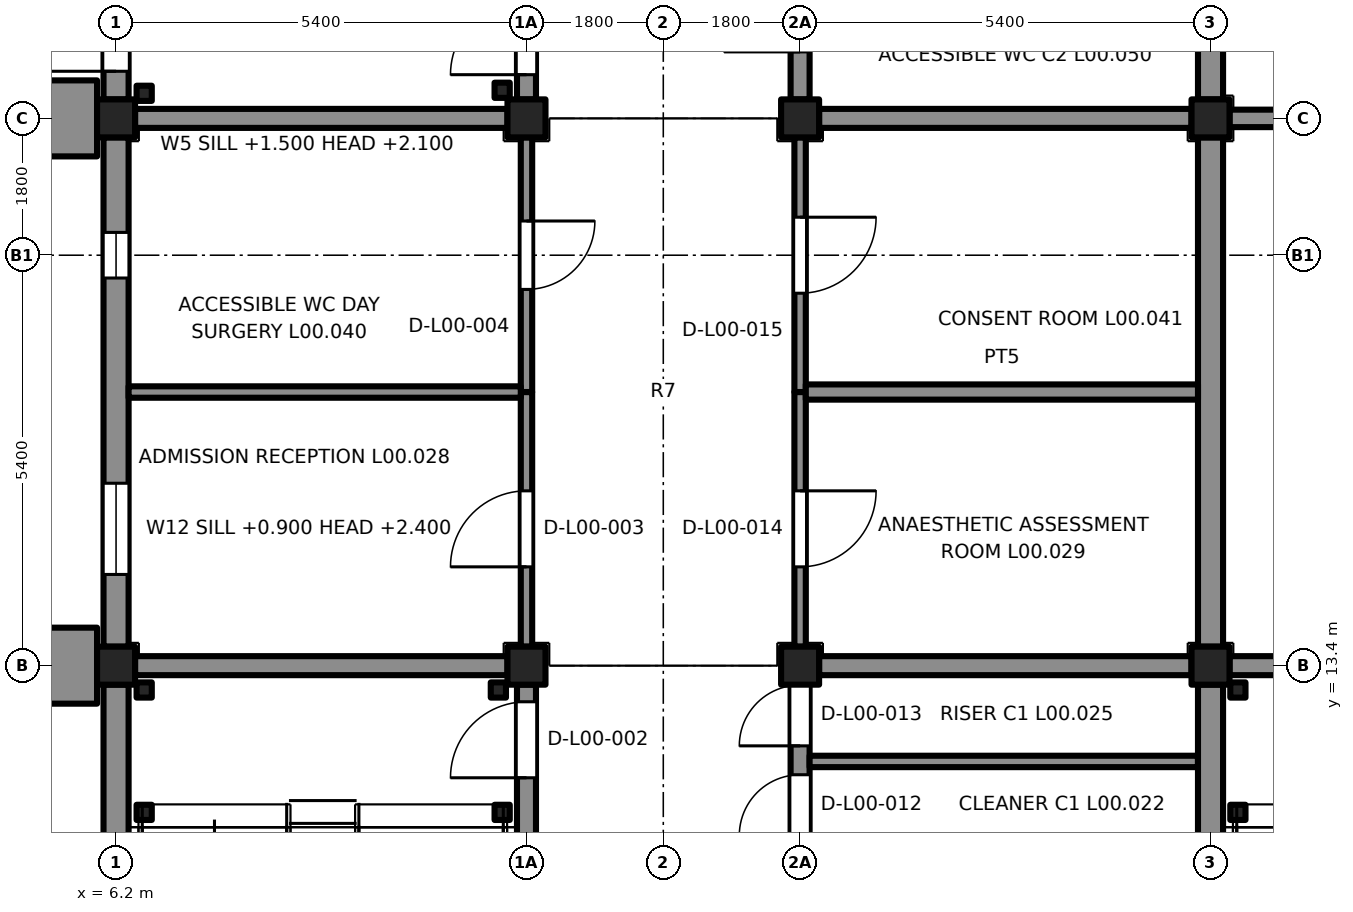
"""IFC4 building model, lengths in metres.
Left out: names, types, materials, properties, quantities, classifications, styles, units other than length and angle.
Written with IfcOpenShell. Run it as: python <this file> out.ifc"""

import sys

from ifc_helpers import new_model, si_unit, direction, frame, frame_2d, origin, origin_2d, place, context, subcontext, project, spatial, rectangle, extrude, element, fill, save


model = new_model("IFC4")
c1 = context("Model", 3, precision=1e-05, world=origin(), true_north=direction((0.0, 1.0)))
c2 = subcontext(c1, "Body", "Model", "MODEL_VIEW")
j1 = project(units=[si_unit("LENGTHUNIT", "METRE"), si_unit("PLANEANGLEUNIT", "RADIAN")], contexts=[c1])
p1 = place(None, origin())
s1 = spatial("IfcSite", under=j1, at=p1, CompositionType="ELEMENT")
p2 = place(p1, origin())
s2 = spatial("IfcBuilding", under=s1, at=p2, CompositionType="ELEMENT")
p3 = place(p2, origin())
s3 = spatial("IfcBuildingStorey", under=s2, at=p3, CompositionType="ELEMENT", Elevation=0.0)
for number, where, z_axis, x_axis in (
    (1, (6.2, 13.4, -0.2), (0.0, 0.0, 1.0), (1.0, 0.0, 0.0)),
    (2, (6.2, 20.6, -0.2), (0.0, 0.0, 1.0), (1.0, 0.0, 0.0)),
    (3, (11.6, 13.4, -0.2), (0.0, 0.0, 1.0), (1.0, 0.0, 0.0)),
    (4, (11.6, 20.6, -0.2), (0.0, 0.0, 1.0), (1.0, 0.0, 0.0)),
    (5, (15.2, 13.4, -0.2), (0.0, 0.0, 1.0), (1.0, 0.0, 0.0)),
    (6, (15.2, 20.6, -0.2), (0.0, 0.0, 1.0), (1.0, 0.0, 0.0)),
    (7, (20.6, 13.4, -0.2), (0.0, 0.0, 1.0), (1.0, 0.0, 0.0)),
    (8, (20.6, 20.6, -0.2), (0.0, 0.0, 1.0), (1.0, 0.0, 0.0)),
):
    element("IfcColumn", number, at=place(p3, frame(where, z_axis=z_axis, x_axis=x_axis)), inside=s3, PredefinedType="COLUMN", context=c2, shape_type="SweptSolid", body=[
        extrude(rectangle(XDim=0.5, YDim=0.5, at=origin_2d()), origin(), (0.0, 0.0, 1.0), 5.45),
    ])
p4 = place(p3, frame((11.6, 6.365, 0.0), z_axis=(0.0, 0.0, 1.0), x_axis=(0.0, 1.0, 0.0)))
e9 = element("IfcWall", 9, at=p4, inside=s3, PredefinedType="SHEAR", context=c2, shape_type="SweptSolid", body=[
    extrude(rectangle(XDim=6.785, YDim=0.25, at=frame_2d((3.393, 0.0))), origin(), (0.0, 0.0, 1.0), 6.05),
])
p5 = place(p4, frame((5.56, 0.0, 0.0)))
e10 = element("IfcOpeningElement", 10, at=p5, cuts=e9, PredefinedType="OPENING", context=c2, shape_type="SweptSolid", body=[
    extrude(rectangle(XDim=1.0, YDim=2.1, at=frame_2d((0.5, 1.05))), frame((0.0, 0.135, 0.0), z_axis=(0.0, -1.0, 0.0), x_axis=(1.0, 0.0, 0.0)), (0.0, 0.0, 1.0), 0.27),
])
p6 = place(p3, frame((6.45, 13.4, 0.0), z_axis=(0.0, 0.0, 1.0), x_axis=(1.0, 0.0, 0.0)))
e11 = element("IfcWall", 11, at=p6, inside=s3, PredefinedType="SHEAR", context=c2, shape_type="SweptSolid", body=[
    extrude(rectangle(XDim=4.9, YDim=0.25, at=frame_2d((2.45, 0.0))), origin(), (0.0, 0.0, 1.0), 6.05),
])
p7 = place(p3, frame((15.2, 6.365, 0.0), z_axis=(0.0, 0.0, 1.0), x_axis=(0.0, 1.0, 0.0)))
e12 = element("IfcWall", 12, at=p7, inside=s3, PredefinedType="SHEAR", context=c2, shape_type="SweptSolid", body=[
    extrude(rectangle(XDim=6.785, YDim=0.25, at=frame_2d((3.393, 0.0))), origin(), (0.0, 0.0, 1.0), 6.05),
])
p8 = place(p7, frame((0.75, 0.0, 0.0)))
e13 = element("IfcOpeningElement", 13, at=p8, cuts=e12, PredefinedType="OPENING", context=c2, shape_type="SweptSolid", body=[
    extrude(rectangle(XDim=1.0, YDim=2.1, at=frame_2d((0.5, 1.05))), frame((0.0, 0.135, 0.0), z_axis=(0.0, -1.0, 0.0), x_axis=(1.0, 0.0, 0.0)), (0.0, 0.0, 1.0), 0.27),
])
p9 = place(p7, frame((3.15, 0.0, 0.0)))
e14 = element("IfcOpeningElement", 14, at=p9, cuts=e12, PredefinedType="OPENING", context=c2, shape_type="SweptSolid", body=[
    extrude(rectangle(XDim=0.9, YDim=2.1, at=frame_2d((0.45, 1.05))), frame((0.0, 0.135, 0.0), z_axis=(0.0, -1.0, 0.0), x_axis=(1.0, 0.0, 0.0)), (0.0, 0.0, 1.0), 0.27),
])
p10 = place(p7, frame((4.8, 0.0, 0.0)))
e15 = element("IfcOpeningElement", 15, at=p10, cuts=e12, PredefinedType="OPENING", context=c2, shape_type="SweptSolid", body=[
    extrude(rectangle(XDim=0.8, YDim=2.1, at=frame_2d((0.4, 1.05))), frame((0.0, 0.135, 0.0), z_axis=(0.0, -1.0, 0.0), x_axis=(1.0, 0.0, 0.0)), (0.0, 0.0, 1.0), 0.27),
])
p11 = place(p7, frame((5.98, 0.0, 0.0)))
e16 = element("IfcOpeningElement", 16, at=p11, cuts=e12, PredefinedType="OPENING", context=c2, shape_type="SweptSolid", body=[
    extrude(rectangle(XDim=0.8, YDim=2.1, at=frame_2d((0.4, 1.05))), frame((0.0, 0.135, 0.0), z_axis=(0.0, -1.0, 0.0), x_axis=(1.0, 0.0, 0.0)), (0.0, 0.0, 1.0), 0.27),
])
p12 = place(p3, frame((15.45, 13.4, 0.0), z_axis=(0.0, 0.0, 1.0), x_axis=(1.0, 0.0, 0.0)))
e17 = element("IfcWall", 17, at=p12, inside=s3, PredefinedType="SHEAR", context=c2, shape_type="SweptSolid", body=[
    extrude(rectangle(XDim=4.9, YDim=0.25, at=frame_2d((2.45, 0.0))), origin(), (0.0, 0.0, 1.0), 6.05),
])
p13 = place(p3, frame((15.325, 12.14, 0.0), z_axis=(0.0, 0.0, 1.0), x_axis=(1.0, 0.0, 0.0)))
e18 = element("IfcWall", 18, at=p13, inside=s3, PredefinedType="PARTITIONING", context=c2, shape_type="SweptSolid", body=[
    extrude(rectangle(XDim=5.11, YDim=0.15, at=frame_2d((2.555, 0.0))), origin(), (0.0, 0.0, 1.0), 6.05),
])
for number, where, z_axis, x_axis in (
    (19, (6.57, 11.47, 0.0), (0.0, 0.0, 1.0), (1.0, 0.0, 0.0)),
    (20, (6.57, 13.08, 0.0), (0.0, 0.0, 1.0), (1.0, 0.0, 0.0)),
    (21, (11.28, 11.47, 0.0), (0.0, 0.0, 1.0), (1.0, 0.0, 0.0)),
    (22, (11.23, 13.08, 0.0), (0.0, 0.0, 1.0), (1.0, 0.0, 0.0)),
):
    element("IfcColumn", number, at=place(p3, frame(where, z_axis=z_axis, x_axis=x_axis)), inside=s3, PredefinedType="COLUMN", context=c2, shape_type="SweptSolid", body=[
        extrude(rectangle(XDim=0.2, YDim=0.2, at=origin_2d()), origin(), (0.0, 0.0, 1.0), 2.95),
    ])
p14 = place(p3, frame((11.6, 20.85, 0.0), z_axis=(0.0, 0.0, 1.0), x_axis=(0.0, 1.0, 0.0)))
e23 = element("IfcWall", 23, at=p14, inside=s3, PredefinedType="SHEAR", context=c2, shape_type="SweptSolid", body=[
    extrude(rectangle(XDim=6.7, YDim=0.25, at=frame_2d((3.35, 0.0))), origin(), (0.0, 0.0, 1.0), 6.05),
])
p15 = place(p14, frame((0.325, 0.0, 0.0)))
e24 = element("IfcOpeningElement", 24, at=p15, cuts=e23, PredefinedType="OPENING", context=c2, shape_type="SweptSolid", body=[
    extrude(rectangle(XDim=1.0, YDim=2.1, at=frame_2d((0.5, 1.05))), frame((0.0, 0.135, 0.0), z_axis=(0.0, -1.0, 0.0), x_axis=(1.0, 0.0, 0.0)), (0.0, 0.0, 1.0), 0.27),
])
p16 = place(p3, frame((6.45, 20.6, 0.0), z_axis=(0.0, 0.0, 1.0), x_axis=(1.0, 0.0, 0.0)))
e25 = element("IfcWall", 25, at=p16, inside=s3, PredefinedType="SHEAR", context=c2, shape_type="SweptSolid", body=[
    extrude(rectangle(XDim=4.9, YDim=0.25, at=frame_2d((2.45, 0.0))), origin(), (0.0, 0.0, 1.0), 6.05),
])
p17 = place(p3, frame((15.2, 20.85, 0.0), z_axis=(0.0, 0.0, 1.0), x_axis=(0.0, 1.0, 0.0)))
e26 = element("IfcWall", 26, at=p17, inside=s3, PredefinedType="SHEAR", context=c2, shape_type="SweptSolid", body=[
    extrude(rectangle(XDim=6.7, YDim=0.25, at=frame_2d((3.35, 0.0))), origin(), (0.0, 0.0, 1.0), 6.05),
])
p18 = place(p17, frame((0.625, 0.0, 0.0)))
e27 = element("IfcOpeningElement", 27, at=p18, cuts=e26, PredefinedType="OPENING", context=c2, shape_type="SweptSolid", body=[
    extrude(rectangle(XDim=1.0, YDim=2.1, at=frame_2d((0.5, 1.05))), frame((0.0, 0.135, 0.0), z_axis=(0.0, -1.0, 0.0), x_axis=(1.0, 0.0, 0.0)), (0.0, 0.0, 1.0), 0.27),
])
p19 = place(p17, frame((3.025, 0.0, 0.0)))
e28 = element("IfcOpeningElement", 28, at=p19, cuts=e26, PredefinedType="OPENING", context=c2, shape_type="SweptSolid", body=[
    extrude(rectangle(XDim=0.9, YDim=2.1, at=frame_2d((0.45, 1.05))), frame((0.0, 0.135, 0.0), z_axis=(0.0, -1.0, 0.0), x_axis=(1.0, 0.0, 0.0)), (0.0, 0.0, 1.0), 0.27),
])
p20 = place(p17, frame((4.675, 0.0, 0.0)))
e29 = element("IfcOpeningElement", 29, at=p20, cuts=e26, PredefinedType="OPENING", context=c2, shape_type="SweptSolid", body=[
    extrude(rectangle(XDim=0.8, YDim=2.1, at=frame_2d((0.4, 1.05))), frame((0.0, 0.135, 0.0), z_axis=(0.0, -1.0, 0.0), x_axis=(1.0, 0.0, 0.0)), (0.0, 0.0, 1.0), 0.27),
])
p21 = place(p17, frame((5.875, 0.0, 0.0)))
e30 = element("IfcOpeningElement", 30, at=p21, cuts=e26, PredefinedType="OPENING", context=c2, shape_type="SweptSolid", body=[
    extrude(rectangle(XDim=0.8, YDim=2.1, at=frame_2d((0.4, 1.05))), frame((0.0, 0.135, 0.0), z_axis=(0.0, -1.0, 0.0), x_axis=(1.0, 0.0, 0.0)), (0.0, 0.0, 1.0), 0.27),
])
p22 = place(p3, frame((15.45, 20.6, 0.0), z_axis=(0.0, 0.0, 1.0), x_axis=(1.0, 0.0, 0.0)))
e31 = element("IfcWall", 31, at=p22, inside=s3, PredefinedType="SHEAR", context=c2, shape_type="SweptSolid", body=[
    extrude(rectangle(XDim=4.9, YDim=0.25, at=frame_2d((2.45, 0.0))), origin(), (0.0, 0.0, 1.0), 6.05),
])
for number, where, z_axis, x_axis in (
    (32, (6.57, 20.93, 0.0), (0.0, 0.0, 1.0), (1.0, 0.0, 0.0)),
    (33, (11.28, 20.97, 0.0), (0.0, 0.0, 1.0), (1.0, 0.0, 0.0)),
):
    element("IfcColumn", number, at=place(p3, frame(where, z_axis=z_axis, x_axis=x_axis)), inside=s3, PredefinedType="COLUMN", context=c2, shape_type="SweptSolid", body=[
        extrude(rectangle(XDim=0.2, YDim=0.2, at=origin_2d()), origin(), (0.0, 0.0, 1.0), 2.95),
    ])
p23 = place(p3, frame((20.85, 13.4, 0.0), z_axis=(0.0, 0.0, 1.0), x_axis=(1.0, 0.0, 0.0)))
e34 = element("IfcWall", 34, at=p23, inside=s3, PredefinedType="SHEAR", context=c2, shape_type="SweptSolid", body=[
    extrude(rectangle(XDim=4.9, YDim=0.25, at=frame_2d((2.45, 0.0))), origin(), (0.0, 0.0, 1.0), 6.05),
])
for number, where, z_axis, x_axis in (
    (35, (20.96, 11.47, 0.0), (0.0, 0.0, 1.0), (1.0, 0.0, 0.0)),
    (36, (20.96, 13.08, 0.0), (0.0, 0.0, 1.0), (1.0, 0.0, 0.0)),
):
    element("IfcColumn", number, at=place(p3, frame(where, z_axis=z_axis, x_axis=x_axis)), inside=s3, PredefinedType="COLUMN", context=c2, shape_type="SweptSolid", body=[
        extrude(rectangle(XDim=0.2, YDim=0.2, at=origin_2d()), origin(), (0.0, 0.0, 1.0), 2.95),
    ])
p24 = place(p3, frame((6.2, 10.5, 0.0), z_axis=(0.0, 0.0, 1.0), x_axis=(0.0, 1.0, 0.0)))
e37 = element("IfcWall", 37, at=p24, inside=s3, PredefinedType="SOLIDWALL", context=c2, shape_type="SweptSolid", body=[
    extrude(rectangle(XDim=2.65, YDim=0.33, at=frame_2d((1.325, 0.0))), origin(), (0.0, 0.0, 1.0), 5.25),
])
p25 = place(p3, frame((6.2, 13.65, 0.0), z_axis=(0.0, 0.0, 1.0), x_axis=(0.0, 1.0, 0.0)))
e38 = element("IfcWall", 38, at=p25, inside=s3, PredefinedType="SOLIDWALL", context=c2, shape_type="SweptSolid", body=[
    extrude(rectangle(XDim=6.7, YDim=0.33, at=frame_2d((3.35, 0.0))), origin(), (0.0, 0.0, 1.0), 5.25),
])
p26 = place(p25, frame((0.95, 0.0, 0.9)))
e39 = element("IfcOpeningElement", 39, at=p26, cuts=e38, PredefinedType="OPENING", context=c2, shape_type="SweptSolid", body=[
    extrude(rectangle(XDim=1.2, YDim=1.5, at=frame_2d((0.6, 0.75))), frame((0.0, 0.175, 0.0), z_axis=(0.0, -1.0, 0.0), x_axis=(1.0, 0.0, 0.0)), (0.0, 0.0, 1.0), 0.35),
])
p27 = place(p25, frame((4.85, 0.0, 1.5)))
e40 = element("IfcOpeningElement", 40, at=p27, cuts=e38, PredefinedType="OPENING", context=c2, shape_type="SweptSolid", body=[
    extrude(rectangle(XDim=0.6, YDim=0.6, at=frame_2d((0.3, 0.3))), frame((0.0, 0.175, 0.0), z_axis=(0.0, -1.0, 0.0), x_axis=(1.0, 0.0, 0.0)), (0.0, 0.0, 1.0), 0.35),
])
p28 = place(p3, frame((6.2, 20.85, 0.0), z_axis=(0.0, 0.0, 1.0), x_axis=(0.0, 1.0, 0.0)))
e41 = element("IfcWall", 41, at=p28, inside=s3, PredefinedType="SOLIDWALL", context=c2, shape_type="SweptSolid", body=[
    extrude(rectangle(XDim=2.65, YDim=0.33, at=frame_2d((1.325, 0.0))), origin(), (0.0, 0.0, 1.0), 5.25),
])
p29 = place(p28, frame((0.37, 0.0, 0.0)))
e42 = element("IfcOpeningElement", 42, at=p29, cuts=e41, PredefinedType="OPENING", context=c2, shape_type="SweptSolid", body=[
    extrude(rectangle(XDim=1.2, YDim=2.1, at=frame_2d((0.6, 1.05))), frame((0.0, 0.175, 0.0), z_axis=(0.0, -1.0, 0.0), x_axis=(1.0, 0.0, 0.0)), (0.0, 0.0, 1.0), 0.35),
])
for number, where, z_axis, x_axis in (
    (43, (5.575, 12.9, 0.0), (0.0, 0.0, 1.0), (0.0, 1.0, 0.0)),
    (44, (5.575, 20.1, 0.0), (0.0, 0.0, 1.0), (0.0, 1.0, 0.0)),
):
    element("IfcWall", number, at=place(p3, frame(where, z_axis=z_axis, x_axis=x_axis)), inside=s3, PredefinedType="SOLIDWALL", context=c2, shape_type="SweptSolid", body=[
        extrude(rectangle(XDim=1.0, YDim=0.75, at=frame_2d((0.5, 0.0))), origin(), (0.0, 0.0, 1.0), 6.3),
    ])
p30 = place(p3, frame((20.6, 13.15, 0.0), z_axis=(0.0, 0.0, 1.0), x_axis=(0.0, -1.0, 0.0)))
e45 = element("IfcWall", 45, at=p30, inside=s3, PredefinedType="SOLIDWALL", context=c2, shape_type="SweptSolid", body=[
    extrude(rectangle(XDim=7.115, YDim=0.33, at=frame_2d((3.558, 0.0))), origin(), (0.0, 0.0, 1.0), 5.25),
])
p31 = place(p3, frame((20.6, 20.35, 0.0), z_axis=(0.0, 0.0, 1.0), x_axis=(0.0, -1.0, 0.0)))
e46 = element("IfcWall", 46, at=p31, inside=s3, PredefinedType="SOLIDWALL", context=c2, shape_type="SweptSolid", body=[
    extrude(rectangle(XDim=6.7, YDim=0.33, at=frame_2d((3.35, 0.0))), origin(), (0.0, 0.0, 1.0), 5.25),
])
p32 = place(p3, frame((20.6, 27.55, 0.0), z_axis=(0.0, 0.0, 1.0), x_axis=(0.0, -1.0, 0.0)))
e47 = element("IfcWall", 47, at=p32, inside=s3, PredefinedType="SOLIDWALL", context=c2, shape_type="SweptSolid", body=[
    extrude(rectangle(XDim=6.7, YDim=0.33, at=frame_2d((3.35, 0.0))), origin(), (0.0, 0.0, 1.0), 5.25),
])
p33 = place(p3, frame((11.6, 13.65, 0.0), z_axis=(0.0, 0.0, 1.0), x_axis=(0.0, 1.0, 0.0)))
e48 = element("IfcWall", 48, at=p33, inside=s3, PredefinedType="PARTITIONING", context=c2, shape_type="SweptSolid", body=[
    extrude(rectangle(XDim=3.35, YDim=0.15, at=frame_2d((1.675, 0.0))), origin(), (0.0, 0.0, 1.0), 5.25),
])
p34 = place(p33, frame((1.05, 0.0, 0.0)))
e49 = element("IfcOpeningElement", 49, at=p34, cuts=e48, PredefinedType="OPENING", context=c2, shape_type="SweptSolid", body=[
    extrude(rectangle(XDim=1.0, YDim=2.1, at=frame_2d((0.5, 1.05))), frame((0.0, 0.085, 0.0), z_axis=(0.0, -1.0, 0.0), x_axis=(1.0, 0.0, 0.0)), (0.0, 0.0, 1.0), 0.17),
])
p35 = place(p3, frame((11.6, 20.35, 0.0), z_axis=(0.0, 0.0, 1.0), x_axis=(0.0, -1.0, 0.0)))
e50 = element("IfcWall", 50, at=p35, inside=s3, PredefinedType="PARTITIONING", context=c2, shape_type="SweptSolid", body=[
    extrude(rectangle(XDim=3.35, YDim=0.15, at=frame_2d((1.675, 0.0))), origin(), (0.0, 0.0, 1.0), 5.25),
])
p36 = place(p35, frame((1.1, 0.0, 0.0)))
e51 = element("IfcOpeningElement", 51, at=p36, cuts=e50, PredefinedType="OPENING", context=c2, shape_type="SweptSolid", body=[
    extrude(rectangle(XDim=0.9, YDim=2.1, at=frame_2d((0.45, 1.05))), frame((0.0, 0.085, 0.0), z_axis=(0.0, -1.0, 0.0), x_axis=(1.0, 0.0, 0.0)), (0.0, 0.0, 1.0), 0.17),
])
p37 = place(p3, frame((6.365, 17.0, 0.0), z_axis=(0.0, 0.0, 1.0), x_axis=(1.0, 0.0, 0.0)))
e52 = element("IfcWall", 52, at=p37, inside=s3, PredefinedType="PARTITIONING", context=c2, shape_type="SweptSolid", body=[
    extrude(rectangle(XDim=5.16, YDim=0.15, at=frame_2d((2.58, 0.0))), origin(), (0.0, 0.0, 1.0), 6.05),
])
p38 = place(p3, frame((15.2, 17.0, 0.0), z_axis=(0.0, 0.0, 1.0), x_axis=(0.0, -1.0, 0.0)))
e53 = element("IfcWall", 53, at=p38, inside=s3, PredefinedType="PARTITIONING", context=c2, shape_type="SweptSolid", body=[
    extrude(rectangle(XDim=3.35, YDim=0.15, at=frame_2d((1.675, 0.0))), origin(), (0.0, 0.0, 1.0), 5.25),
])
p39 = place(p38, frame((1.3, 0.0, 0.0)))
e54 = element("IfcOpeningElement", 54, at=p39, cuts=e53, PredefinedType="OPENING", context=c2, shape_type="SweptSolid", body=[
    extrude(rectangle(XDim=1.0, YDim=2.1, at=frame_2d((0.5, 1.05))), frame((0.0, 0.085, 0.0), z_axis=(0.0, -1.0, 0.0), x_axis=(1.0, 0.0, 0.0)), (0.0, 0.0, 1.0), 0.17),
])
p40 = place(p3, frame((15.2, 20.35, 0.0), z_axis=(0.0, 0.0, 1.0), x_axis=(0.0, -1.0, 0.0)))
e55 = element("IfcWall", 55, at=p40, inside=s3, PredefinedType="PARTITIONING", context=c2, shape_type="SweptSolid", body=[
    extrude(rectangle(XDim=3.35, YDim=0.15, at=frame_2d((1.675, 0.0))), origin(), (0.0, 0.0, 1.0), 5.25),
])
p41 = place(p40, frame((1.05, 0.0, 0.0)))
e56 = element("IfcOpeningElement", 56, at=p41, cuts=e55, PredefinedType="OPENING", context=c2, shape_type="SweptSolid", body=[
    extrude(rectangle(XDim=1.0, YDim=2.1, at=frame_2d((0.5, 1.05))), frame((0.0, 0.085, 0.0), z_axis=(0.0, -1.0, 0.0), x_axis=(1.0, 0.0, 0.0)), (0.0, 0.0, 1.0), 0.17),
])
p42 = place(p3, frame((20.435, 17.0, 0.0), z_axis=(0.0, 0.0, 1.0), x_axis=(-1.0, 0.0, 0.0)))
e57 = element("IfcWall", 57, at=p42, inside=s3, PredefinedType="PARTITIONING", context=c2, shape_type="SweptSolid", body=[
    extrude(rectangle(XDim=5.16, YDim=0.2, at=frame_2d((2.58, 0.0))), origin(), (0.0, 0.0, 1.0), 6.05),
])
p43 = place(p3, frame((20.85, 20.6, 0.0), z_axis=(0.0, 0.0, 1.0), x_axis=(1.0, 0.0, 0.0)))
e58 = element("IfcWall", 58, at=p43, inside=s3, PredefinedType="SOLIDWALL", context=c2, shape_type="SweptSolid", body=[
    extrude(rectangle(XDim=4.9, YDim=0.23, at=frame_2d((2.45, 0.0))), origin(), (0.0, 0.0, 1.0), 6.05),
])
p44 = place(p5, origin())
e59 = element("IfcDoor", 59, at=p44, inside=s3, OperationType="SINGLE_SWING_LEFT", PredefinedType="DOOR", context=c2, shape_type="SweptSolid", body=[
    extrude(rectangle(XDim=1.0, YDim=2.1, at=frame_2d((0.5, 1.05))), frame((0.0, 0.025, 0.0), z_axis=(0.0, -1.0, 0.0), x_axis=(1.0, 0.0, 0.0)), (0.0, 0.0, 1.0), 0.05),
])
fill(e10, e59)
p45 = place(p10, origin())
e60 = element("IfcDoor", 60, at=p45, inside=s3, OperationType="SINGLE_SWING_LEFT", PredefinedType="DOOR", context=c2, shape_type="SweptSolid", body=[
    extrude(rectangle(XDim=0.8, YDim=2.1, at=frame_2d((0.4, 1.05))), frame((0.0, 0.025, 0.0), z_axis=(0.0, -1.0, 0.0), x_axis=(1.0, 0.0, 0.0)), (0.0, 0.0, 1.0), 0.05),
])
fill(e15, e60)
p46 = place(p11, origin())
e61 = element("IfcDoor", 61, at=p46, inside=s3, OperationType="SINGLE_SWING_LEFT", PredefinedType="DOOR", context=c2, shape_type="SweptSolid", body=[
    extrude(rectangle(XDim=0.8, YDim=2.1, at=frame_2d((0.4, 1.05))), frame((0.0, 0.025, 0.0), z_axis=(0.0, -1.0, 0.0), x_axis=(1.0, 0.0, 0.0)), (0.0, 0.0, 1.0), 0.05),
])
fill(e16, e61)
p47 = place(p15, origin())
e62 = element("IfcDoor", 62, at=p47, inside=s3, OperationType="SINGLE_SWING_RIGHT", PredefinedType="DOOR", context=c2, shape_type="SweptSolid", body=[
    extrude(rectangle(XDim=1.0, YDim=2.1, at=frame_2d((0.5, 1.05))), frame((0.0, 0.025, 0.0), z_axis=(0.0, -1.0, 0.0), x_axis=(1.0, 0.0, 0.0)), (0.0, 0.0, 1.0), 0.05),
])
fill(e24, e62)
p48 = place(p26, origin())
e63 = element("IfcWindow", 63, at=p48, inside=s3, PartitioningType="SINGLE_PANEL", PredefinedType="WINDOW", context=c2, shape_type="SweptSolid", body=[
    extrude(rectangle(XDim=1.2, YDim=1.5, at=frame_2d((0.6, 0.75))), frame((0.0, -0.03, 0.0), z_axis=(0.0, -1.0, 0.0), x_axis=(1.0, 0.0, 0.0)), (0.0, 0.0, 1.0), 0.06),
])
fill(e39, e63)
p49 = place(p27, origin())
e64 = element("IfcWindow", 64, at=p49, inside=s3, PartitioningType="SINGLE_PANEL", PredefinedType="WINDOW", context=c2, shape_type="SweptSolid", body=[
    extrude(rectangle(XDim=0.6, YDim=0.6, at=frame_2d((0.3, 0.3))), frame((0.0, -0.03, 0.0), z_axis=(0.0, -1.0, 0.0), x_axis=(1.0, 0.0, 0.0)), (0.0, 0.0, 1.0), 0.06),
])
fill(e40, e64)
p50 = place(p29, origin())
e65 = element("IfcDoor", 65, at=p50, inside=s3, OperationType="SINGLE_SWING_LEFT", PredefinedType="DOOR", context=c2, shape_type="SweptSolid", body=[
    extrude(rectangle(XDim=1.2, YDim=2.1, at=frame_2d((0.6, 1.05))), frame((0.0, 0.025, 0.0), z_axis=(0.0, -1.0, 0.0), x_axis=(1.0, 0.0, 0.0)), (0.0, 0.0, 1.0), 0.05),
])
fill(e42, e65)
p51 = place(p34, origin())
e66 = element("IfcDoor", 66, at=p51, inside=s3, OperationType="SINGLE_SWING_LEFT", PredefinedType="DOOR", context=c2, shape_type="SweptSolid", body=[
    extrude(rectangle(XDim=1.0, YDim=2.1, at=frame_2d((0.5, 1.05))), frame((0.0, 0.025, 0.0), z_axis=(0.0, -1.0, 0.0), x_axis=(1.0, 0.0, 0.0)), (0.0, 0.0, 1.0), 0.05),
])
fill(e49, e66)
p52 = place(p36, origin())
e67 = element("IfcDoor", 67, at=p52, inside=s3, OperationType="SINGLE_SWING_LEFT", PredefinedType="DOOR", context=c2, shape_type="SweptSolid", body=[
    extrude(rectangle(XDim=0.9, YDim=2.1, at=frame_2d((0.45, 1.05))), frame((0.0, 0.025, 0.0), z_axis=(0.0, -1.0, 0.0), x_axis=(1.0, 0.0, 0.0)), (0.0, 0.0, 1.0), 0.05),
])
fill(e51, e67)
p53 = place(p39, origin())
e68 = element("IfcDoor", 68, at=p53, inside=s3, OperationType="SINGLE_SWING_RIGHT", PredefinedType="DOOR", context=c2, shape_type="SweptSolid", body=[
    extrude(rectangle(XDim=1.0, YDim=2.1, at=frame_2d((0.5, 1.05))), frame((0.0, 0.025, 0.0), z_axis=(0.0, -1.0, 0.0), x_axis=(1.0, 0.0, 0.0)), (0.0, 0.0, 1.0), 0.05),
])
fill(e54, e68)
p54 = place(p41, origin())
e69 = element("IfcDoor", 69, at=p54, inside=s3, OperationType="SINGLE_SWING_LEFT", PredefinedType="DOOR", context=c2, shape_type="SweptSolid", body=[
    extrude(rectangle(XDim=1.0, YDim=2.1, at=frame_2d((0.5, 1.05))), frame((0.0, 0.025, 0.0), z_axis=(0.0, -1.0, 0.0), x_axis=(1.0, 0.0, 0.0)), (0.0, 0.0, 1.0), 0.05),
])
fill(e56, e69)
save(model, sys.argv[1])
